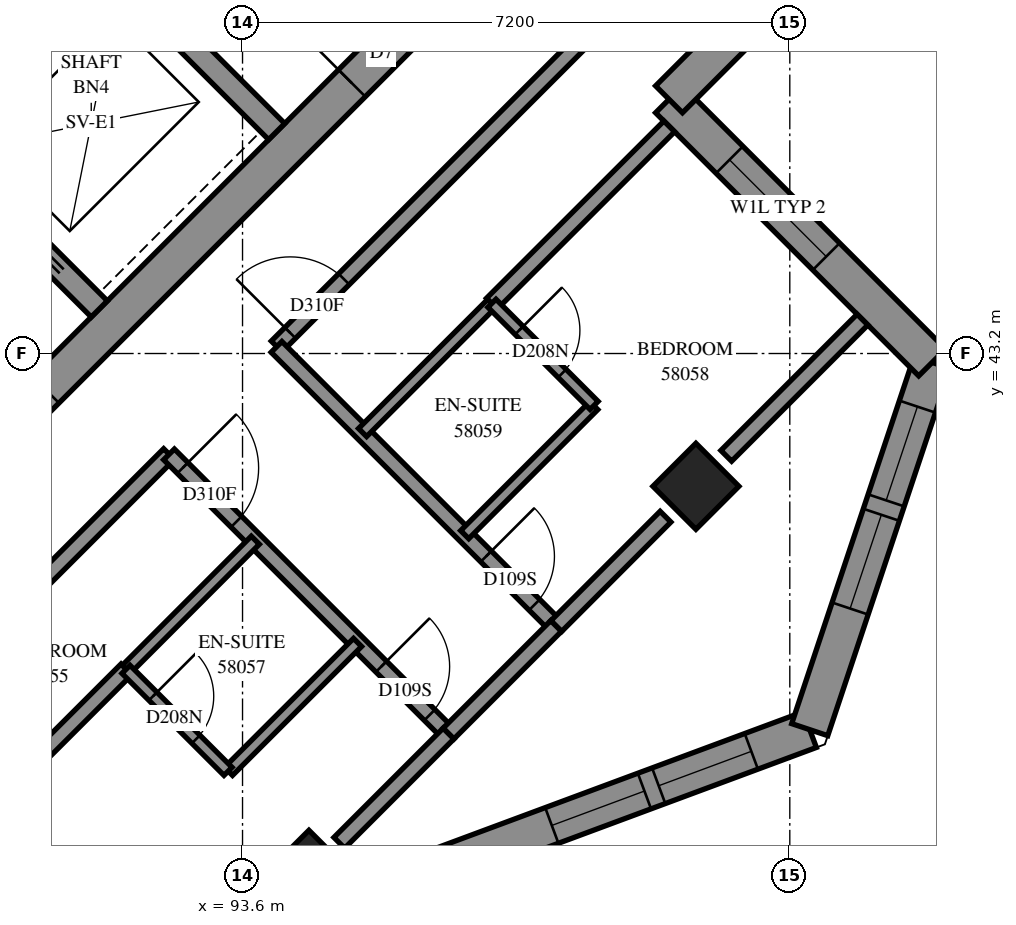
"""IFC4 building model, lengths in metres.
Left out: names, types, materials, properties, quantities, classifications, styles, units other than length and angle.
Written with IfcOpenShell. Run it as: python <this file> out.ifc"""

import sys

from ifc_helpers import new_model, si_unit, direction, frame, frame_2d, origin, origin_2d, place, context, subcontext, project, spatial, polyline, rectangle, outline, extrude, element, fill, save


model = new_model("IFC4")
c1 = context("Model", 3, precision=1e-05, world=origin(), true_north=direction((0.0, 1.0)))
c2 = subcontext(c1, "Body", "Model", "MODEL_VIEW")
j1 = project(units=[si_unit("LENGTHUNIT", "METRE"), si_unit("PLANEANGLEUNIT", "RADIAN")], contexts=[c1])
p1 = place(None, origin())
s1 = spatial("IfcSite", under=j1, at=p1, CompositionType="ELEMENT")
p2 = place(p1, origin())
s2 = spatial("IfcBuilding", under=s1, at=p2, CompositionType="ELEMENT")
p3 = place(p2, frame((0.0, 0.0, 213.4)))
s3 = spatial("IfcBuildingStorey", under=s2, at=p3, CompositionType="ELEMENT", Elevation=213.4)
for number, where, z_axis, x_axis in (
    (1, (99.565, 41.453, 0.0), (0.0, 0.0, 1.0), (0.707, -0.707, 0.0)),
    (2, (94.474, 36.362, 0.0), (0.0, 0.0, 1.0), (0.707, -0.707, 0.0)),
):
    element("IfcColumn", number, at=place(p3, frame(where, z_axis=z_axis, x_axis=x_axis)), inside=s3, PredefinedType="COLUMN", context=c2, shape_type="SweptSolid", body=[
        extrude(rectangle(XDim=0.8, YDim=0.8, at=origin_2d()), origin(), (0.0, 0.0, 1.0), 3.1),
    ])
p4 = place(p3, frame((87.013, 38.731, -0.3), z_axis=(0.0, 0.0, 1.0), x_axis=(0.7071067812, 0.7071067812, 0.0)))
e3 = element("IfcWall", 3, at=p4, inside=s3, PredefinedType="SHEAR", context=c2, shape_type="SweptSolid", body=[
    extrude(rectangle(XDim=14.4, YDim=0.5, at=frame_2d((7.2, 0.0))), origin(), (0.0, 0.0, 1.0), 2.7),
])
p5 = place(p4, frame((4.55, 0.0, 0.3)))
e4 = element("IfcOpeningElement", 4, at=p5, cuts=e3, PredefinedType="OPENING", context=c2, shape_type="SweptSolid", body=[
    extrude(rectangle(XDim=1.1, YDim=2.1, at=frame_2d((0.55, 1.05))), frame((0.0, 0.26, 0.0), z_axis=(0.0, -1.0, 0.0), x_axis=(1.0, 0.0, 0.0)), (0.0, 0.0, 1.0), 0.52),
])
p6 = place(p4, frame((11.35, 0.0, 0.3)))
e5 = element("IfcOpeningElement", 5, at=p6, cuts=e3, PredefinedType="OPENING", context=c2, shape_type="SweptSolid", body=[
    extrude(rectangle(XDim=1.1, YDim=2.1, at=frame_2d((0.55, 1.05))), frame((0.0, 0.26, 0.0), z_axis=(0.0, -1.0, 0.0), x_axis=(1.0, 0.0, 0.0)), (0.0, 0.0, 1.0), 0.52),
])
p7 = place(p3, frame((89.17, 46.332, 0.0), z_axis=(0.0, 0.0, 1.0), x_axis=(0.7071067812, 0.7071067812, 0.0)))
e6 = element("IfcWall", 6, at=p7, inside=s3, PredefinedType="SOLIDWALL", context=c2, shape_type="SweptSolid", body=[
    extrude(rectangle(XDim=3.3, YDim=0.3, at=frame_2d((1.65, 0.0))), origin(), (0.0, 0.0, 1.0), 3.1),
])
p8 = place(p3, frame((81.534, 53.969, 0.0), z_axis=(0.0, 0.0, 1.0), x_axis=(0.707103309, -0.7071102534, 0.0)))
e7 = element("IfcWall", 7, at=p8, inside=s3, PredefinedType="SOLIDWALL", context=c2, shape_type="SweptSolid", body=[
    extrude(rectangle(XDim=14.4, YDim=0.3, at=frame_2d((7.2, 0.0))), origin(), (0.0, 0.0, 1.0), 3.1),
])
p9 = place(p8, frame((1.25, 0.0, 0.0)))
e8 = element("IfcOpeningElement", 8, at=p9, cuts=e7, PredefinedType="OPENING", context=c2, shape_type="SweptSolid", body=[
    extrude(rectangle(XDim=1.1, YDim=2.1, at=frame_2d((0.55, 1.05))), frame((0.0, 0.16, 0.0), z_axis=(0.0, -1.0, 0.0), x_axis=(1.0, 0.0, 0.0)), (0.0, 0.0, 1.0), 0.32),
])
p10 = place(p8, frame((4.85, 0.0, 0.0)))
e9 = element("IfcOpeningElement", 9, at=p10, cuts=e7, PredefinedType="OPENING", context=c2, shape_type="SweptSolid", body=[
    extrude(rectangle(XDim=1.1, YDim=2.1, at=frame_2d((0.55, 1.05))), frame((0.0, 0.16, 0.0), z_axis=(0.0, -1.0, 0.0), x_axis=(1.0, 0.0, 0.0)), (0.0, 0.0, 1.0), 0.32),
])
p11 = place(p8, frame((8.45, 0.0, 0.0)))
e10 = element("IfcOpeningElement", 10, at=p11, cuts=e7, PredefinedType="OPENING", context=c2, shape_type="SweptSolid", body=[
    extrude(rectangle(XDim=1.1, YDim=2.1, at=frame_2d((0.55, 1.05))), frame((0.0, 0.16, 0.0), z_axis=(0.0, -1.0, 0.0), x_axis=(1.0, 0.0, 0.0)), (0.0, 0.0, 1.0), 0.32),
])
p12 = place(p8, frame((12.05, 0.0, 0.0)))
e11 = element("IfcOpeningElement", 11, at=p12, cuts=e7, PredefinedType="OPENING", context=c2, shape_type="SweptSolid", body=[
    extrude(rectangle(XDim=1.1, YDim=2.1, at=frame_2d((0.55, 1.05))), frame((0.0, 0.16, 0.0), z_axis=(0.0, -1.0, 0.0), x_axis=(1.0, 0.0, 0.0)), (0.0, 0.0, 1.0), 0.32),
])
p13 = place(p3, frame((88.958, 51.211, 0.0), z_axis=(0.0, 0.0, 1.0), x_axis=(0.7070998367, -0.7071137256, 0.0)))
e12 = element("IfcWall", 12, at=p13, inside=s3, PredefinedType="SOLIDWALL", context=c2, shape_type="SweptSolid", body=[
    extrude(rectangle(XDim=7.2, YDim=0.3, at=frame_2d((3.6, 0.0))), origin(), (0.0, 0.0, 1.0), 3.1),
])
p14 = place(p3, frame((96.118, 36.415, 0.0), z_axis=(0.0, 0.0, 1.0), x_axis=(0.9374238577, 0.3481903374, 0.0)))
e13 = element("IfcWall", 13, at=p14, inside=s3, PredefinedType="SOLIDWALL", context=c2, shape_type="SweptSolid", body=[
    extrude(outline(polyline([(0.115, -0.25), (5.395, -0.25), (5.155, 0.25), (-0.115, 0.25), (0.115, -0.25)])), origin(), (0.0, 0.0, 1.0), 3.1),
])
p15 = place(p14, frame((1.655, 0.0, 0.45)))
e14 = element("IfcOpeningElement", 14, at=p15, cuts=e13, PredefinedType="OPENING", context=c2, shape_type="SweptSolid", body=[
    extrude(rectangle(XDim=1.3, YDim=2.5, at=frame_2d((0.65, 1.25))), frame((0.0, 0.26, 0.0), z_axis=(0.0, -1.0, 0.0), x_axis=(1.0, 0.0, 0.0)), (0.0, 0.0, 1.0), 0.52),
])
p16 = place(p14, frame((3.155, 0.0, 0.45)))
e15 = element("IfcOpeningElement", 15, at=p16, cuts=e13, PredefinedType="OPENING", context=c2, shape_type="SweptSolid", body=[
    extrude(rectangle(XDim=1.3, YDim=2.5, at=frame_2d((0.65, 1.25))), frame((0.0, 0.26, 0.0), z_axis=(0.0, -1.0, 0.0), x_axis=(1.0, 0.0, 0.0)), (0.0, 0.0, 1.0), 0.52),
])
p17 = place(p3, frame((101.062, 38.252, 0.0), z_axis=(0.0, 0.0, 1.0), x_axis=(0.3162395484, 0.9486793705, 0.0)))
e16 = element("IfcWall", 16, at=p17, inside=s3, PredefinedType="SOLIDWALL", context=c2, shape_type="SweptSolid", body=[
    extrude(outline(polyline([(-0.12, -0.25), (5.247, -0.25), (4.938, 0.25), (0.12, 0.25), (-0.12, -0.25)])), origin(), (0.0, 0.0, 1.0), 3.1),
])
p18 = place(p17, frame((1.68, 0.0, 0.45)))
e17 = element("IfcOpeningElement", 17, at=p18, cuts=e16, PredefinedType="OPENING", context=c2, shape_type="SweptSolid", body=[
    extrude(rectangle(XDim=1.3, YDim=2.5, at=frame_2d((0.65, 1.25))), frame((0.0, 0.26, 0.0), z_axis=(0.0, -1.0, 0.0), x_axis=(1.0, 0.0, 0.0)), (0.0, 0.0, 1.0), 0.52),
])
p19 = place(p17, frame((3.18, 0.0, 0.45)))
e18 = element("IfcOpeningElement", 18, at=p19, cuts=e16, PredefinedType="OPENING", context=c2, shape_type="SweptSolid", body=[
    extrude(rectangle(XDim=1.3, YDim=2.5, at=frame_2d((0.65, 1.25))), frame((0.0, 0.26, 0.0), z_axis=(0.0, -1.0, 0.0), x_axis=(1.0, 0.0, 0.0)), (0.0, 0.0, 1.0), 0.52),
])
p20 = place(p3, frame((102.673, 43.083, 0.0), z_axis=(0.0, 0.0, 1.0), x_axis=(-0.7071067812, 0.7071067812, 0.0)))
e19 = element("IfcWall", 19, at=p20, inside=s3, PredefinedType="SOLIDWALL", context=c2, shape_type="SweptSolid", body=[
    extrude(outline(polyline([(-0.154, -0.25), (4.646, -0.25), (5.146, 0.25), (0.154, 0.25), (-0.154, -0.25)])), origin(), (0.0, 0.0, 1.0), 3.1),
])
p21 = place(p20, frame((1.97, 0.0, 0.6)))
e20 = element("IfcOpeningElement", 20, at=p21, cuts=e19, PredefinedType="OPENING", context=c2, shape_type="SweptSolid", body=[
    extrude(rectangle(XDim=1.8, YDim=1.9, at=frame_2d((0.9, 0.95))), frame((0.0, 0.26, 0.0), z_axis=(0.0, -1.0, 0.0), x_axis=(1.0, 0.0, 0.0)), (0.0, 0.0, 1.0), 0.52),
])
p22 = place(p3, frame((99.211, 46.544, 0.0), z_axis=(0.0, 0.0, 1.0), x_axis=(0.7071153793, 0.7070981829, 0.0)))
e21 = element("IfcWall", 21, at=p22, inside=s3, PredefinedType="SOLIDWALL", context=c2, shape_type="SweptSolid", body=[
    extrude(outline(polyline([(0.25, -0.25), (6.162, -0.25), (5.468, 0.25), (-0.25, 0.25), (0.25, -0.25)])), origin(), (0.0, 0.0, 1.0), 3.1),
])
p23 = place(p22, frame((1.125, 0.0, 0.6)))
e22 = element("IfcOpeningElement", 22, at=p23, cuts=e21, PredefinedType="OPENING", context=c2, shape_type="SweptSolid", body=[
    extrude(rectangle(XDim=1.8, YDim=1.9, at=frame_2d((0.9, 0.95))), frame((0.0, 0.26, 0.0), z_axis=(0.0, -1.0, 0.0), x_axis=(1.0, 0.0, 0.0)), (0.0, 0.0, 1.0), 0.52),
])
p24 = place(p22, frame((3.959, 0.0, 0.6)))
e23 = element("IfcOpeningElement", 23, at=p24, cuts=e21, PredefinedType="OPENING", context=c2, shape_type="SweptSolid", body=[
    extrude(rectangle(XDim=1.2, YDim=1.9, at=frame_2d((0.6, 0.95))), frame((0.0, 0.26, 0.0), z_axis=(0.0, -1.0, 0.0), x_axis=(1.0, 0.0, 0.0)), (0.0, 0.0, 1.0), 0.52),
])
p25 = place(p3, frame((85.007, 31.981, 0.0), z_axis=(0.0, 0.0, 1.0), x_axis=(0.7072318784, 0.7069816619, 0.0)))
e24 = element("IfcWall", 24, at=p25, inside=s3, PredefinedType="PARTITIONING", context=c2, shape_type="SweptSolid", body=[
    extrude(rectangle(XDim=9.991, YDim=0.2, at=frame_2d((4.996, 0.0))), origin(), (0.0, 0.0, 1.0), 3.1),
])
p26 = place(p3, frame((94.049, 43.293, 0.0), z_axis=(0.0, 0.0, 1.0), x_axis=(0.7071067812, 0.7071067812, 0.0)))
e25 = element("IfcWall", 25, at=p26, inside=s3, PredefinedType="PARTITIONING", context=c2, shape_type="SweptSolid", body=[
    extrude(rectangle(XDim=8.2, YDim=0.2, at=frame_2d((4.1, 0.0))), origin(), (0.0, 0.0, 1.0), 3.1),
])
p27 = place(p26, frame((0.252, 0.0, 0.0)))
e26 = element("IfcOpeningElement", 26, at=p27, cuts=e25, PredefinedType="OPENING", context=c2, shape_type="SweptSolid", body=[
    extrude(rectangle(XDim=1.0, YDim=2.1, at=frame_2d((0.5, 1.05))), frame((0.0, 0.11, 0.0), z_axis=(0.0, -1.0, 0.0), x_axis=(1.0, 0.0, 0.0)), (0.0, 0.0, 1.0), 0.22),
])
p28 = place(p3, frame((86.835, 36.079, 0.0), z_axis=(0.0, 0.0, 1.0), x_axis=(0.7071067812, 0.7071067812, 0.0)))
e27 = element("IfcWall", 27, at=p28, inside=s3, PredefinedType="PARTITIONING", context=c2, shape_type="SweptSolid", body=[
    extrude(rectangle(XDim=8.2, YDim=0.2, at=frame_2d((4.1, 0.0))), origin(), (0.0, 0.0, 1.0), 3.1),
])
p29 = place(p3, frame((94.047, 43.287, 0.0), z_axis=(0.0, 0.0, 1.0), x_axis=(0.7071067812, -0.7071067812, 0.0)))
e28 = element("IfcWall", 28, at=p29, inside=s3, PredefinedType="PARTITIONING", context=c2, shape_type="SweptSolid", body=[
    extrude(rectangle(XDim=5.199, YDim=0.2, at=frame_2d((2.599, 0.0))), origin(), (0.0, 0.0, 1.0), 3.1),
])
p30 = place(p29, frame((3.898, 0.0, 0.0)))
e29 = element("IfcOpeningElement", 29, at=p30, cuts=e28, PredefinedType="OPENING", context=c2, shape_type="SweptSolid", body=[
    extrude(rectangle(XDim=0.9, YDim=2.1, at=frame_2d((0.45, 1.05))), frame((0.0, 0.11, 0.0), z_axis=(0.0, -1.0, 0.0), x_axis=(1.0, 0.0, 0.0)), (0.0, 0.0, 1.0), 0.22),
])
p31 = place(p3, frame((92.633, 41.873, 0.0), z_axis=(0.0, 0.0, 1.0), x_axis=(0.7071067812, -0.7071067812, 0.0)))
e30 = element("IfcWall", 30, at=p31, inside=s3, PredefinedType="PARTITIONING", context=c2, shape_type="SweptSolid", body=[
    extrude(rectangle(XDim=5.199, YDim=0.2, at=frame_2d((2.599, 0.0))), origin(), (0.0, 0.0, 1.0), 3.1),
])
p32 = place(p31, frame((0.253, 0.0, 0.0)))
e31 = element("IfcOpeningElement", 31, at=p32, cuts=e30, PredefinedType="OPENING", context=c2, shape_type="SweptSolid", body=[
    extrude(rectangle(XDim=1.0, YDim=2.1, at=frame_2d((0.5, 1.05))), frame((0.0, 0.11, 0.0), z_axis=(0.0, -1.0, 0.0), x_axis=(1.0, 0.0, 0.0)), (0.0, 0.0, 1.0), 0.22),
])
p33 = place(p31, frame((3.948, 0.0, 0.0)))
e32 = element("IfcOpeningElement", 32, at=p33, cuts=e30, PredefinedType="OPENING", context=c2, shape_type="SweptSolid", body=[
    extrude(rectangle(XDim=0.9, YDim=2.1, at=frame_2d((0.45, 1.05))), frame((0.0, 0.11, 0.0), z_axis=(0.0, -1.0, 0.0), x_axis=(1.0, 0.0, 0.0)), (0.0, 0.0, 1.0), 0.22),
])
p34 = place(p3, frame((96.88, 43.856, 0.0), z_axis=(0.0, 0.0, 1.0), x_axis=(0.7074098182, 0.7068036142, 0.0)))
e33 = element("IfcWall", 33, at=p34, inside=s3, PredefinedType="PARTITIONING", context=c2, shape_type="SweptSolid", body=[
    extrude(rectangle(XDim=3.299, YDim=0.2, at=frame_2d((1.65, 0.0))), origin(), (0.0, 0.0, 1.0), 3.1),
])
p35 = place(p3, frame((99.964, 41.854, 0.0), z_axis=(0.0, 0.0, 1.0), x_axis=(0.7071265121, 0.7070870497, 0.0)))
e34 = element("IfcWall", 34, at=p35, inside=s3, PredefinedType="PARTITIONING", context=c2, shape_type="SweptSolid", body=[
    extrude(rectangle(XDim=2.534, YDim=0.2, at=frame_2d((1.267, 0.0))), origin(), (0.0, 0.0, 1.0), 3.1),
])
for number, where, z_axis, x_axis in (
    (35, (96.523, 40.817, 0.0), (0.0, 0.0, 1.0), (0.707, 0.707, 0.0)),
    (36, (95.179, 42.161, 0.0), (0.0, 0.0, 1.0), (0.707, 0.707, 0.0)),
):
    element("IfcWall", number, at=place(p3, frame(where, z_axis=z_axis, x_axis=x_axis)), inside=s3, PredefinedType="PARTITIONING", context=c2, shape_type="SweptSolid", body=[
        extrude(rectangle(XDim=2.401, YDim=0.15, at=frame_2d((1.201, 0.0))), origin(), (0.0, 0.0, 1.0), 3.1),
    ])
for number, where, z_axis, x_axis in (
    (37, (92.072, 39.046, 0.0), (0.0, 0.0, 1.0), (0.707, 0.708, 0.0)),
    (38, (93.415, 37.703, 0.0), (0.0, 0.0, 1.0), (0.708, 0.707, 0.0)),
):
    element("IfcWall", number, at=place(p3, frame(where, z_axis=z_axis, x_axis=x_axis)), inside=s3, PredefinedType="PARTITIONING", context=c2, shape_type="SweptSolid", body=[
        extrude(rectangle(XDim=2.4, YDim=0.15, at=frame_2d((1.2, 0.0))), origin(), (0.0, 0.0, 1.0), 3.1),
    ])
p36 = place(p3, frame((97.727, 39.613, 0.0), z_axis=(0.0, 0.0, 1.0), x_axis=(0.7066152229, 0.7075979979, 0.0)))
e39 = element("IfcWall", 39, at=p36, inside=s3, PredefinedType="PARTITIONING", context=c2, shape_type="SweptSolid", body=[
    extrude(rectangle(XDim=2.035, YDim=0.2, at=frame_2d((1.018, 0.0))), origin(), (0.0, 0.0, 1.0), 2.6),
])
p37 = place(p3, frame((94.873, 36.763, 0.0), z_axis=(0.0, 0.0, 1.0), x_axis=(0.7071067812, 0.7071067812, 0.0)))
e40 = element("IfcWall", 40, at=p37, inside=s3, PredefinedType="PARTITIONING", context=c2, shape_type="SweptSolid", body=[
    extrude(rectangle(XDim=2.034, YDim=0.2, at=frame_2d((1.017, 0.0))), origin(), (0.0, 0.0, 1.0), 2.6),
])
p38 = place(p3, frame((96.311, 38.201, 0.0), z_axis=(0.0, 0.0, 1.0), x_axis=(0.7071067812, 0.7071067812, 0.0)))
e41 = element("IfcWall", 41, at=p38, inside=s3, PredefinedType="PARTITIONING", context=c2, shape_type="SweptSolid", body=[
    extrude(rectangle(XDim=2.0, YDim=0.2, at=frame_2d((1.0, 0.0))), origin(), (0.0, 0.0, 1.0), 2.6),
])
p39 = place(p3, frame((96.881, 43.861, 0.0), z_axis=(0.0, 0.0, 1.0), x_axis=(0.7071067812, -0.7071067812, 0.0)))
e42 = element("IfcWall", 42, at=p39, inside=s3, PredefinedType="PARTITIONING", context=c2, shape_type="SweptSolid", body=[
    extrude(rectangle(XDim=1.901, YDim=0.15, at=frame_2d((0.95, 0.0))), origin(), (0.0, 0.0, 1.0), 3.1),
])
p40 = place(p39, frame((0.505, 0.0, 0.0)))
e43 = element("IfcOpeningElement", 43, at=p40, cuts=e42, PredefinedType="OPENING", context=c2, shape_type="SweptSolid", body=[
    extrude(rectangle(XDim=0.8, YDim=2.1, at=frame_2d((0.4, 1.05))), frame((0.0, 0.085, 0.0), z_axis=(0.0, -1.0, 0.0), x_axis=(1.0, 0.0, 0.0)), (0.0, 0.0, 1.0), 0.17),
])
p41 = place(p3, frame((92.067, 39.045, 0.0), z_axis=(0.0, 0.0, 1.0), x_axis=(0.7071067812, -0.7071067812, 0.0)))
e44 = element("IfcWall", 44, at=p41, inside=s3, PredefinedType="PARTITIONING", context=c2, shape_type="SweptSolid", body=[
    extrude(rectangle(XDim=1.898, YDim=0.15, at=frame_2d((0.949, 0.0))), origin(), (0.0, 0.0, 1.0), 3.1),
])
p42 = place(p41, frame((0.501, 0.0, 0.0)))
e45 = element("IfcOpeningElement", 45, at=p42, cuts=e44, PredefinedType="OPENING", context=c2, shape_type="SweptSolid", body=[
    extrude(rectangle(XDim=0.8, YDim=2.1, at=frame_2d((0.4, 1.05))), frame((0.0, 0.085, 0.0), z_axis=(0.0, -1.0, 0.0), x_axis=(1.0, 0.0, 0.0)), (0.0, 0.0, 1.0), 0.17),
])
p43 = place(p15, origin())
e46 = element("IfcWindow", 46, at=p43, inside=s3, PartitioningType="SINGLE_PANEL", PredefinedType="WINDOW", context=c2, shape_type="SweptSolid", body=[
    extrude(rectangle(XDim=1.3, YDim=2.5, at=frame_2d((0.65, 1.25))), frame((0.0, 0.18, 0.0), z_axis=(0.0, -1.0, 0.0), x_axis=(1.0, 0.0, 0.0)), (0.0, 0.0, 1.0), 0.06),
])
fill(e14, e46)
p44 = place(p16, origin())
e47 = element("IfcWindow", 47, at=p44, inside=s3, PartitioningType="SINGLE_PANEL", PredefinedType="WINDOW", context=c2, shape_type="SweptSolid", body=[
    extrude(rectangle(XDim=1.3, YDim=2.5, at=frame_2d((0.65, 1.25))), frame((0.0, 0.18, 0.0), z_axis=(0.0, -1.0, 0.0), x_axis=(1.0, 0.0, 0.0)), (0.0, 0.0, 1.0), 0.06),
])
fill(e15, e47)
p45 = place(p18, origin())
e48 = element("IfcWindow", 48, at=p45, inside=s3, PartitioningType="SINGLE_PANEL", PredefinedType="WINDOW", context=c2, shape_type="SweptSolid", body=[
    extrude(rectangle(XDim=1.3, YDim=2.5, at=frame_2d((0.65, 1.25))), frame((0.0, 0.18, 0.0), z_axis=(0.0, -1.0, 0.0), x_axis=(1.0, 0.0, 0.0)), (0.0, 0.0, 1.0), 0.06),
])
fill(e17, e48)
p46 = place(p19, origin())
e49 = element("IfcWindow", 49, at=p46, inside=s3, PartitioningType="SINGLE_PANEL", PredefinedType="WINDOW", context=c2, shape_type="SweptSolid", body=[
    extrude(rectangle(XDim=1.3, YDim=2.5, at=frame_2d((0.65, 1.25))), frame((0.0, 0.18, 0.0), z_axis=(0.0, -1.0, 0.0), x_axis=(1.0, 0.0, 0.0)), (0.0, 0.0, 1.0), 0.06),
])
fill(e18, e49)
p47 = place(p21, origin())
e50 = element("IfcWindow", 50, at=p47, inside=s3, PartitioningType="SINGLE_PANEL", PredefinedType="WINDOW", context=c2, shape_type="SweptSolid", body=[
    extrude(rectangle(XDim=1.8, YDim=1.9, at=frame_2d((0.9, 0.95))), frame((0.0, 0.18, 0.0), z_axis=(0.0, -1.0, 0.0), x_axis=(1.0, 0.0, 0.0)), (0.0, 0.0, 1.0), 0.06),
])
fill(e20, e50)
p48 = place(p6, origin())
e51 = element("IfcDoor", 51, at=p48, inside=s3, OperationType="SINGLE_SWING_RIGHT", PredefinedType="DOOR", context=c2, shape_type="SweptSolid", body=[
    extrude(rectangle(XDim=1.1, YDim=2.1, at=frame_2d((0.55, 1.05))), frame((0.0, 0.025, 0.0), z_axis=(0.0, -1.0, 0.0), x_axis=(1.0, 0.0, 0.0)), (0.0, 0.0, 1.0), 0.05),
])
fill(e5, e51)
p49 = place(p27, origin())
e52 = element("IfcDoor", 52, at=p49, inside=s3, OperationType="SINGLE_SWING_RIGHT", PredefinedType="DOOR", context=c2, shape_type="SweptSolid", body=[
    extrude(rectangle(XDim=1.0, YDim=2.1, at=frame_2d((0.5, 1.05))), frame((0.0, 0.025, 0.0), z_axis=(0.0, -1.0, 0.0), x_axis=(1.0, 0.0, 0.0)), (0.0, 0.0, 1.0), 0.05),
])
fill(e26, e52)
p50 = place(p32, origin())
e53 = element("IfcDoor", 53, at=p50, inside=s3, OperationType="SINGLE_SWING_RIGHT", PredefinedType="DOOR", context=c2, shape_type="SweptSolid", body=[
    extrude(rectangle(XDim=1.0, YDim=2.1, at=frame_2d((0.5, 1.05))), frame((0.0, 0.025, 0.0), z_axis=(0.0, -1.0, 0.0), x_axis=(1.0, 0.0, 0.0)), (0.0, 0.0, 1.0), 0.05),
])
fill(e31, e53)
p51 = place(p33, origin())
e54 = element("IfcDoor", 54, at=p51, inside=s3, OperationType="SINGLE_SWING_LEFT", PredefinedType="DOOR", context=c2, shape_type="SweptSolid", body=[
    extrude(rectangle(XDim=0.9, YDim=2.1, at=frame_2d((0.45, 1.05))), frame((0.0, 0.025, 0.0), z_axis=(0.0, -1.0, 0.0), x_axis=(1.0, 0.0, 0.0)), (0.0, 0.0, 1.0), 0.05),
])
fill(e32, e54)
p52 = place(p42, origin())
e55 = element("IfcDoor", 55, at=p52, inside=s3, OperationType="SINGLE_SWING_RIGHT", PredefinedType="DOOR", context=c2, shape_type="SweptSolid", body=[
    extrude(rectangle(XDim=0.8, YDim=2.1, at=frame_2d((0.4, 1.05))), frame((0.0, 0.025, 0.0), z_axis=(0.0, -1.0, 0.0), x_axis=(1.0, 0.0, 0.0)), (0.0, 0.0, 1.0), 0.05),
])
fill(e45, e55)
p53 = place(p30, origin())
e56 = element("IfcDoor", 56, at=p53, inside=s3, OperationType="SINGLE_SWING_RIGHT", PredefinedType="DOOR", context=c2, shape_type="SweptSolid", body=[
    extrude(rectangle(XDim=0.9, YDim=2.1, at=frame_2d((0.45, 1.05))), frame((0.0, 0.025, 0.0), z_axis=(0.0, -1.0, 0.0), x_axis=(1.0, 0.0, 0.0)), (0.0, 0.0, 1.0), 0.05),
])
fill(e29, e56)
p54 = place(p40, origin())
e57 = element("IfcDoor", 57, at=p54, inside=s3, OperationType="SINGLE_SWING_RIGHT", PredefinedType="DOOR", context=c2, shape_type="SweptSolid", body=[
    extrude(rectangle(XDim=0.8, YDim=2.1, at=frame_2d((0.4, 1.05))), frame((0.0, 0.025, 0.0), z_axis=(0.0, -1.0, 0.0), x_axis=(1.0, 0.0, 0.0)), (0.0, 0.0, 1.0), 0.05),
])
fill(e43, e57)
save(model, sys.argv[1])
